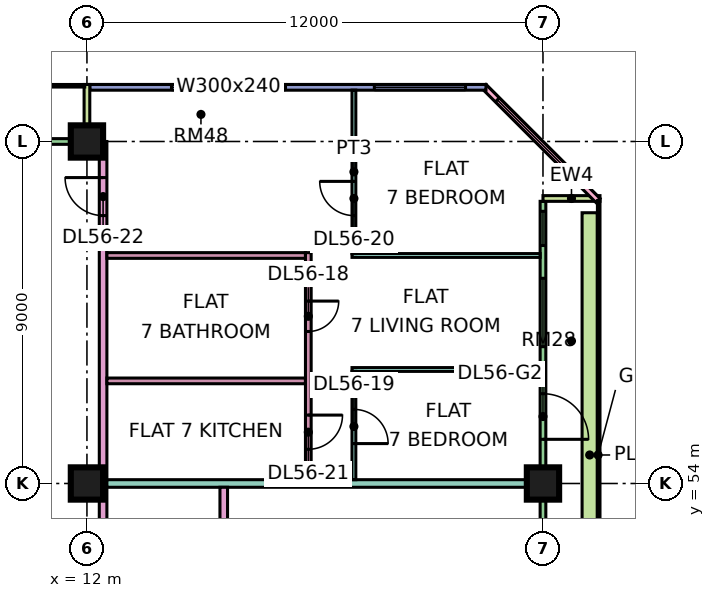
"""IFC4 building model, lengths in metres.
Left out: names, types, materials, properties, quantities, classifications, styles, units other than length and angle.
Written with IfcOpenShell. Run it as: python <this file> out.ifc"""

import sys

from ifc_helpers import new_model, si_unit, direction, frame, frame_2d, origin, origin_2d, place, context, subcontext, project, spatial, rectangle, extrude, element, fill, save


model = new_model("IFC4")
c1 = context("Model", 3, precision=1e-05, world=origin(), true_north=direction((0.0, 1.0)))
c2 = subcontext(c1, "Body", "Model", "MODEL_VIEW")
j1 = project(units=[si_unit("LENGTHUNIT", "METRE"), si_unit("PLANEANGLEUNIT", "RADIAN")], contexts=[c1])
p1 = place(None, origin())
s1 = spatial("IfcSite", under=j1, at=p1, CompositionType="ELEMENT")
p2 = place(p1, origin())
s2 = spatial("IfcBuilding", under=s1, at=p2, CompositionType="ELEMENT")
p3 = place(p2, frame((0.0, 0.0, 237.9)))
s3 = spatial("IfcBuildingStorey", under=s2, at=p3, CompositionType="ELEMENT", Elevation=237.9)
for number, where, z_axis, x_axis in (
    (1, (12.0, 54.0, 0.0), (0.0, 0.0, 1.0), (1.0, 0.0, 0.0)),
    (2, (12.0, 63.0, 0.0), (0.0, 0.0, 1.0), (1.0, 0.0, 0.0)),
    (3, (24.0, 54.0, 0.0), (0.0, 0.0, 1.0), (1.0, 0.0, 0.0)),
):
    element("IfcColumn", number, at=place(p3, frame(where, z_axis=z_axis, x_axis=x_axis)), inside=s3, PredefinedType="COLUMN", context=c2, shape_type="SweptSolid", body=[
        extrude(rectangle(XDim=0.85, YDim=0.85, at=origin_2d()), origin(), (0.0, 0.0, 1.0), 3.75),
    ])
p4 = place(p3, frame((24.0, 48.075, 0.0), z_axis=(0.0, 0.0, 1.0), x_axis=(0.0, 1.0, 0.0)))
e4 = element("IfcWall", 4, at=p4, inside=s3, PredefinedType="SOLIDWALL", context=c2, shape_type="SweptSolid", body=[
    extrude(rectangle(XDim=13.35, YDim=0.15, at=frame_2d((6.675, 0.0))), origin(), (0.0, 0.0, 1.0), 3.35),
])
p5 = place(p4, frame((0.6, 0.0, 0.45)))
e5 = element("IfcOpeningElement", 5, at=p5, cuts=e4, PredefinedType="OPENING", context=c2, shape_type="SweptSolid", body=[
    extrude(rectangle(XDim=4.2, YDim=2.4, at=frame_2d((2.1, 1.2))), frame((0.0, 0.085, 0.0), z_axis=(0.0, -1.0, 0.0), x_axis=(1.0, 0.0, 0.0)), (0.0, 0.0, 1.0), 0.17),
])
p6 = place(p4, frame((7.087, 0.0, 0.0)))
e6 = element("IfcOpeningElement", 6, at=p6, cuts=e4, PredefinedType="OPENING", context=c2, shape_type="SweptSolid", body=[
    extrude(rectangle(XDim=1.2, YDim=2.4, at=frame_2d((0.6, 1.2))), frame((0.0, 0.085, 0.0), z_axis=(0.0, -1.0, 0.0), x_axis=(1.0, 0.0, 0.0)), (0.0, 0.0, 1.0), 0.17),
])
p7 = place(p4, frame((9.525, 0.0, 0.45)))
e7 = element("IfcOpeningElement", 7, at=p7, cuts=e4, PredefinedType="OPENING", context=c2, shape_type="SweptSolid", body=[
    extrude(rectangle(XDim=1.8, YDim=2.4, at=frame_2d((0.9, 1.2))), frame((0.0, 0.085, 0.0), z_axis=(0.0, -1.0, 0.0), x_axis=(1.0, 0.0, 0.0)), (0.0, 0.0, 1.0), 0.17),
])
p8 = place(p4, frame((12.188, 0.0, 0.45)))
e8 = element("IfcOpeningElement", 8, at=p8, cuts=e4, PredefinedType="OPENING", context=c2, shape_type="SweptSolid", body=[
    extrude(rectangle(XDim=0.9, YDim=2.4, at=frame_2d((0.45, 1.2))), frame((0.0, 0.085, 0.0), z_axis=(0.0, -1.0, 0.0), x_axis=(1.0, 0.0, 0.0)), (0.0, 0.0, 1.0), 0.17),
])
p9 = place(p3, frame((25.5, 61.5, 0.0), z_axis=(0.0, 0.0, 1.0), x_axis=(-1.0, 0.0, 0.0)))
e9 = element("IfcWall", 9, at=p9, inside=s3, PredefinedType="SOLIDWALL", context=c2, shape_type="SweptSolid", body=[
    extrude(rectangle(XDim=1.5, YDim=0.15, at=frame_2d((0.75, 0.0))), origin(), (0.0, 0.0, 1.0), 3.35),
])
p10 = place(p3, frame((25.447, 61.447, 0.0), z_axis=(0.0, 0.0, 1.0), x_axis=(-0.707106781187, 0.707106781187, 0.0)))
e10 = element("IfcWall", 10, at=p10, inside=s3, PredefinedType="SOLIDWALL", context=c2, shape_type="SweptSolid", body=[
    extrude(rectangle(XDim=4.243, YDim=0.15, at=frame_2d((2.121, 0.0))), origin(), (0.0, 0.0, 1.0), 3.35),
])
p11 = place(p10, frame((0.744, 0.0, 0.45)))
e11 = element("IfcOpeningElement", 11, at=p11, cuts=e10, PredefinedType="OPENING", context=c2, shape_type="SweptSolid", body=[
    extrude(rectangle(XDim=3.0, YDim=2.4, at=frame_2d((1.5, 1.2))), frame((0.0, 0.085, 0.0), z_axis=(0.0, -1.0, 0.0), x_axis=(1.0, 0.0, 0.0)), (0.0, 0.0, 1.0), 0.17),
])
p12 = place(p3, frame((22.5, 64.425, 0.0), z_axis=(0.0, 0.0, 1.0), x_axis=(-1.0, 0.0, 0.0)))
e12 = element("IfcWall", 12, at=p12, inside=s3, PredefinedType="SOLIDWALL", context=c2, shape_type="SweptSolid", body=[
    extrude(rectangle(XDim=10.425, YDim=0.15, at=frame_2d((5.212, 0.0))), origin(), (0.0, 0.0, 1.0), 3.35),
])
p13 = place(p12, frame((0.538, 0.0, 0.45)))
e13 = element("IfcOpeningElement", 13, at=p13, cuts=e12, PredefinedType="OPENING", context=c2, shape_type="SweptSolid", body=[
    extrude(rectangle(XDim=2.4, YDim=2.4, at=frame_2d((1.2, 1.2))), frame((0.0, 0.085, 0.0), z_axis=(0.0, -1.0, 0.0), x_axis=(1.0, 0.0, 0.0)), (0.0, 0.0, 1.0), 0.17),
])
p14 = place(p12, frame((5.275, 0.0, 0.45)))
e14 = element("IfcOpeningElement", 14, at=p14, cuts=e12, PredefinedType="OPENING", context=c2, shape_type="SweptSolid", body=[
    extrude(rectangle(XDim=3.0, YDim=2.4, at=frame_2d((1.5, 1.2))), frame((0.0, 0.085, 0.0), z_axis=(0.0, -1.0, 0.0), x_axis=(1.0, 0.0, 0.0)), (0.0, 0.0, 1.0), 0.17),
])
p15 = place(p3, frame((11.925, 63.0, 0.0), z_axis=(0.0, 0.0, 1.0), x_axis=(-1.0, 0.0, 0.0)))
e15 = element("IfcWall", 15, at=p15, inside=s3, PredefinedType="SOLIDWALL", context=c2, shape_type="SweptSolid", body=[
    extrude(rectangle(XDim=10.35, YDim=0.15, at=frame_2d((5.175, 0.0))), origin(), (0.0, 0.0, 1.0), 3.35),
])
p16 = place(p15, frame((2.775, 0.0, 0.45)))
e16 = element("IfcOpeningElement", 16, at=p16, cuts=e15, PredefinedType="OPENING", context=c2, shape_type="SweptSolid", body=[
    extrude(rectangle(XDim=2.4, YDim=2.4, at=frame_2d((1.2, 1.2))), frame((0.0, 0.085, 0.0), z_axis=(0.0, -1.0, 0.0), x_axis=(1.0, 0.0, 0.0)), (0.0, 0.0, 1.0), 0.17),
])
p17 = place(p15, frame((7.087, 0.0, 0.0)))
e17 = element("IfcOpeningElement", 17, at=p17, cuts=e15, PredefinedType="OPENING", context=c2, shape_type="SweptSolid", body=[
    extrude(rectangle(XDim=1.8, YDim=2.4, at=frame_2d((0.9, 1.2))), frame((0.0, 0.085, 0.0), z_axis=(0.0, -1.0, 0.0), x_axis=(1.0, 0.0, 0.0)), (0.0, 0.0, 1.0), 0.17),
])
p18 = place(p3, frame((12.0, 64.5, 0.0), z_axis=(0.0, 0.0, 1.0), x_axis=(0.0, -1.0, 0.0)))
e18 = element("IfcWall", 18, at=p18, inside=s3, PredefinedType="SOLIDWALL", context=c2, shape_type="SweptSolid", body=[
    extrude(rectangle(XDim=1.5, YDim=0.15, at=frame_2d((0.75, 0.0))), origin(), (0.0, 0.0, 1.0), 3.35),
])
p19 = place(p3, frame((25.229, 48.375, 0.0), z_axis=(0.0, 0.0, 1.0), x_axis=(0.0, 1.0, 0.0)))
e19 = element("IfcWall", 19, at=p19, inside=s3, PredefinedType="SOLIDWALL", context=c2, shape_type="SweptSolid", body=[
    extrude(rectangle(XDim=12.75, YDim=0.4, at=frame_2d((6.375, 0.0))), origin(), (0.0, 0.0, 1.0), 0.7),
])
p20 = place(p3, frame((12.425, 20.0, 0.0), z_axis=(0.0, 0.0, 1.0), x_axis=(0.0, 1.0, 0.0)))
e20 = element("IfcWall", 20, at=p20, inside=s3, PredefinedType="PARTITIONING", context=c2, shape_type="SweptSolid", body=[
    extrude(rectangle(XDim=43.0, YDim=0.2, at=frame_2d((21.5, 0.0))), origin(), (0.0, 0.0, 1.0), 3.35),
])
p21 = place(p20, frame((5.95, 0.0, 0.0)))
e21 = element("IfcOpeningElement", 21, at=p21, cuts=e20, PredefinedType="OPENING", context=c2, shape_type="SweptSolid", body=[
    extrude(rectangle(XDim=1.0, YDim=2.1, at=frame_2d((0.5, 1.05))), frame((0.0, 0.11, 0.0), z_axis=(0.0, -1.0, 0.0), x_axis=(1.0, 0.0, 0.0)), (0.0, 0.0, 1.0), 0.22),
])
p22 = place(p20, frame((12.0, 0.0, 0.0)))
e22 = element("IfcOpeningElement", 22, at=p22, cuts=e20, PredefinedType="OPENING", context=c2, shape_type="SweptSolid", body=[
    extrude(rectangle(XDim=1.0, YDim=2.1, at=frame_2d((0.5, 1.05))), frame((0.0, 0.11, 0.0), z_axis=(0.0, -1.0, 0.0), x_axis=(1.0, 0.0, 0.0)), (0.0, 0.0, 1.0), 0.22),
])
p23 = place(p20, frame((16.9, 0.0, 0.0)))
e23 = element("IfcOpeningElement", 23, at=p23, cuts=e20, PredefinedType="OPENING", context=c2, shape_type="SweptSolid", body=[
    extrude(rectangle(XDim=1.0, YDim=2.1, at=frame_2d((0.5, 1.05))), frame((0.0, 0.11, 0.0), z_axis=(0.0, -1.0, 0.0), x_axis=(1.0, 0.0, 0.0)), (0.0, 0.0, 1.0), 0.22),
])
p24 = place(p20, frame((41.05, 0.0, 0.0)))
e24 = element("IfcOpeningElement", 24, at=p24, cuts=e20, PredefinedType="OPENING", context=c2, shape_type="SweptSolid", body=[
    extrude(rectangle(XDim=1.0, YDim=2.1, at=frame_2d((0.5, 1.05))), frame((0.0, 0.11, 0.0), z_axis=(0.0, -1.0, 0.0), x_axis=(1.0, 0.0, 0.0)), (0.0, 0.0, 1.0), 0.22),
])
p25 = place(p20, frame((1.15, 0.0, 0.0)))
e25 = element("IfcOpeningElement", 25, at=p25, cuts=e20, PredefinedType="OPENING", context=c2, shape_type="SweptSolid", body=[
    extrude(rectangle(XDim=1.8, YDim=2.1, at=frame_2d((0.9, 1.05))), frame((0.0, 0.11, 0.0), z_axis=(0.0, -1.0, 0.0), x_axis=(1.0, 0.0, 0.0)), (0.0, 0.0, 1.0), 0.22),
])
p26 = place(p20, frame((28.6, 0.0, 0.0)))
e26 = element("IfcOpeningElement", 26, at=p26, cuts=e20, PredefinedType="OPENING", context=c2, shape_type="SweptSolid", body=[
    extrude(rectangle(XDim=1.8, YDim=2.1, at=frame_2d((0.9, 1.05))), frame((0.0, 0.11, 0.0), z_axis=(0.0, -1.0, 0.0), x_axis=(1.0, 0.0, 0.0)), (0.0, 0.0, 1.0), 0.22),
])
p27 = place(p3, frame((12.525, 54.0, 0.0), z_axis=(0.0, 0.0, 1.0), x_axis=(1.0, 0.0, 0.0)))
e27 = element("IfcWall", 27, at=p27, inside=s3, PredefinedType="PARTITIONING", context=c2, shape_type="SweptSolid", body=[
    extrude(rectangle(XDim=11.401, YDim=0.2, at=frame_2d((5.701, 0.0))), origin(), (0.0, 0.0, 1.0), 3.35),
])
for number, where, z_axis, x_axis in (
    (28, (12.525, 56.7, 0.0), (0.0, 0.0, 1.0), (1.0, 0.0, 0.0)),
    (29, (12.525, 60.0, 0.0), (0.0, 0.0, 1.0), (1.0, 0.0, 0.0)),
):
    element("IfcWall", number, at=place(p3, frame(where, z_axis=z_axis, x_axis=x_axis)), inside=s3, PredefinedType="PARTITIONING", context=c2, shape_type="SweptSolid", body=[
        extrude(rectangle(XDim=5.225, YDim=0.15, at=frame_2d((2.613, 0.0))), origin(), (0.0, 0.0, 1.0), 3.35),
    ])
p28 = place(p3, frame((15.6, 51.225, 0.0), z_axis=(0.0, 0.0, 1.0), x_axis=(0.0, 1.0, 0.0)))
e30 = element("IfcWall", 30, at=p28, inside=s3, PredefinedType="PARTITIONING", context=c2, shape_type="SweptSolid", body=[
    extrude(rectangle(XDim=2.675, YDim=0.2, at=frame_2d((1.337, 0.0))), origin(), (0.0, 0.0, 1.0), 3.35),
])
p29 = place(p3, frame((17.825, 54.1, 0.0), z_axis=(0.0, 0.0, 1.0), x_axis=(0.0, 1.0, 0.0)))
e31 = element("IfcWall", 31, at=p29, inside=s3, PredefinedType="PARTITIONING", context=c2, shape_type="SweptSolid", body=[
    extrude(rectangle(XDim=5.975, YDim=0.15, at=frame_2d((2.987, 0.0))), origin(), (0.0, 0.0, 1.0), 3.35),
])
p30 = place(p29, frame((3.9, 0.0, 0.0)))
e32 = element("IfcOpeningElement", 32, at=p30, cuts=e31, PredefinedType="OPENING", context=c2, shape_type="SweptSolid", body=[
    extrude(rectangle(XDim=0.8, YDim=2.1, at=frame_2d((0.4, 1.05))), frame((0.0, 0.085, 0.0), z_axis=(0.0, -1.0, 0.0), x_axis=(1.0, 0.0, 0.0)), (0.0, 0.0, 1.0), 0.17),
])
p31 = place(p29, frame((0.8, 0.0, 0.0)))
e33 = element("IfcOpeningElement", 33, at=p31, cuts=e31, PredefinedType="OPENING", context=c2, shape_type="SweptSolid", body=[
    extrude(rectangle(XDim=0.9, YDim=2.1, at=frame_2d((0.45, 1.05))), frame((0.0, 0.085, 0.0), z_axis=(0.0, -1.0, 0.0), x_axis=(1.0, 0.0, 0.0)), (0.0, 0.0, 1.0), 0.17),
])
for number, where, z_axis, x_axis in (
    (34, (18.975, 57.0, 0.0), (0.0, 0.0, 1.0), (1.0, 0.0, 0.0)),
    (35, (18.975, 60.0, 0.0), (0.0, 0.0, 1.0), (1.0, 0.0, 0.0)),
):
    element("IfcWall", number, at=place(p3, frame(where, z_axis=z_axis, x_axis=x_axis)), inside=s3, PredefinedType="PARTITIONING", context=c2, shape_type="SweptSolid", body=[
        extrude(rectangle(XDim=4.951, YDim=0.1, at=frame_2d((2.476, 0.0))), origin(), (0.0, 0.0, 1.0), 3.35),
    ])
p32 = place(p3, frame((19.025, 54.1, 0.0), z_axis=(0.0, 0.0, 1.0), x_axis=(0.0, 1.0, 0.0)))
e36 = element("IfcWall", 36, at=p32, inside=s3, PredefinedType="PARTITIONING", context=c2, shape_type="SweptSolid", body=[
    extrude(rectangle(XDim=2.85, YDim=0.1, at=frame_2d((1.425, 0.0))), origin(), (0.0, 0.0, 1.0), 3.35),
])
p33 = place(p32, frame((0.95, 0.0, 0.0)))
e37 = element("IfcOpeningElement", 37, at=p33, cuts=e36, PredefinedType="OPENING", context=c2, shape_type="SweptSolid", body=[
    extrude(rectangle(XDim=0.9, YDim=2.1, at=frame_2d((0.45, 1.05))), frame((0.0, 0.06, 0.0), z_axis=(0.0, -1.0, 0.0), x_axis=(1.0, 0.0, 0.0)), (0.0, 0.0, 1.0), 0.12),
])
p34 = place(p3, frame((19.025, 60.05, 0.0), z_axis=(0.0, 0.0, 1.0), x_axis=(0.0, 1.0, 0.0)))
e38 = element("IfcWall", 38, at=p34, inside=s3, PredefinedType="PARTITIONING", context=c2, shape_type="SweptSolid", body=[
    extrude(rectangle(XDim=4.301, YDim=0.1, at=frame_2d((2.15, 0.0))), origin(), (0.0, 0.0, 1.0), 3.35),
])
p35 = place(p34, frame((1.0, 0.0, 0.0)))
e39 = element("IfcOpeningElement", 39, at=p35, cuts=e38, PredefinedType="OPENING", context=c2, shape_type="SweptSolid", body=[
    extrude(rectangle(XDim=0.9, YDim=2.1, at=frame_2d((0.45, 1.05))), frame((0.0, 0.06, 0.0), z_axis=(0.0, -1.0, 0.0), x_axis=(1.0, 0.0, 0.0)), (0.0, 0.0, 1.0), 0.12),
])
p36 = place(p6, frame((1.2, 0.0, 0.0), z_axis=(0.0, 0.0, 1.0), x_axis=(-1.0, 0.0, 0.0)))
e40 = element("IfcDoor", 40, at=p36, inside=s3, OperationType="DOUBLE_DOOR_SINGLE_SWING", PredefinedType="DOOR", context=c2, shape_type="SweptSolid", body=[
    extrude(rectangle(XDim=1.2, YDim=2.4, at=frame_2d((0.6, 1.2))), frame((0.0, 0.025, 0.0), z_axis=(0.0, -1.0, 0.0), x_axis=(1.0, 0.0, 0.0)), (0.0, 0.0, 1.0), 0.05),
])
fill(e6, e40)
p37 = place(p7, origin())
e41 = element("IfcWindow", 41, at=p37, inside=s3, PartitioningType="SINGLE_PANEL", PredefinedType="WINDOW", context=c2, shape_type="SweptSolid", body=[
    extrude(rectangle(XDim=1.8, YDim=2.4, at=frame_2d((0.9, 1.2))), frame((0.0, 0.03, 0.0), z_axis=(0.0, -1.0, 0.0), x_axis=(1.0, 0.0, 0.0)), (0.0, 0.0, 1.0), 0.06),
])
fill(e7, e41)
p38 = place(p8, origin())
e42 = element("IfcWindow", 42, at=p38, inside=s3, PartitioningType="SINGLE_PANEL", PredefinedType="WINDOW", context=c2, shape_type="SweptSolid", body=[
    extrude(rectangle(XDim=0.9, YDim=2.4, at=frame_2d((0.45, 1.2))), frame((0.0, 0.03, 0.0), z_axis=(0.0, -1.0, 0.0), x_axis=(1.0, 0.0, 0.0)), (0.0, 0.0, 1.0), 0.06),
])
fill(e8, e42)
p39 = place(p11, origin())
e43 = element("IfcWindow", 43, at=p39, inside=s3, PartitioningType="SINGLE_PANEL", PredefinedType="WINDOW", context=c2, shape_type="SweptSolid", body=[
    extrude(rectangle(XDim=3.0, YDim=2.4, at=frame_2d((1.5, 1.2))), frame((0.0, 0.03, 0.0), z_axis=(0.0, -1.0, 0.0), x_axis=(1.0, 0.0, 0.0)), (0.0, 0.0, 1.0), 0.06),
])
fill(e11, e43)
p40 = place(p13, origin())
e44 = element("IfcWindow", 44, at=p40, inside=s3, PartitioningType="SINGLE_PANEL", PredefinedType="WINDOW", context=c2, shape_type="SweptSolid", body=[
    extrude(rectangle(XDim=2.4, YDim=2.4, at=frame_2d((1.2, 1.2))), frame((0.0, 0.03, 0.0), z_axis=(0.0, -1.0, 0.0), x_axis=(1.0, 0.0, 0.0)), (0.0, 0.0, 1.0), 0.06),
])
fill(e13, e44)
p41 = place(p14, origin())
e45 = element("IfcWindow", 45, at=p41, inside=s3, PartitioningType="SINGLE_PANEL", PredefinedType="WINDOW", context=c2, shape_type="SweptSolid", body=[
    extrude(rectangle(XDim=3.0, YDim=2.4, at=frame_2d((1.5, 1.2))), frame((0.0, 0.03, 0.0), z_axis=(0.0, -1.0, 0.0), x_axis=(1.0, 0.0, 0.0)), (0.0, 0.0, 1.0), 0.06),
])
fill(e14, e45)
p42 = place(p30, origin())
e46 = element("IfcDoor", 46, at=p42, inside=s3, OperationType="SINGLE_SWING_RIGHT", PredefinedType="DOOR", context=c2, shape_type="SweptSolid", body=[
    extrude(rectangle(XDim=0.8, YDim=2.1, at=frame_2d((0.4, 1.05))), frame((0.0, 0.025, 0.0), z_axis=(0.0, -1.0, 0.0), x_axis=(1.0, 0.0, 0.0)), (0.0, 0.0, 1.0), 0.05),
])
fill(e32, e46)
p43 = place(p33, frame((0.9, 0.0, 0.0), z_axis=(0.0, 0.0, 1.0), x_axis=(-1.0, 0.0, 0.0)))
e47 = element("IfcDoor", 47, at=p43, inside=s3, OperationType="SINGLE_SWING_LEFT", PredefinedType="DOOR", context=c2, shape_type="SweptSolid", body=[
    extrude(rectangle(XDim=0.9, YDim=2.1, at=frame_2d((0.45, 1.05))), frame((0.0, 0.025, 0.0), z_axis=(0.0, -1.0, 0.0), x_axis=(1.0, 0.0, 0.0)), (0.0, 0.0, 1.0), 0.05),
])
fill(e37, e47)
p44 = place(p35, frame((0.9, 0.0, 0.0), z_axis=(0.0, 0.0, 1.0), x_axis=(-1.0, 0.0, 0.0)))
e48 = element("IfcDoor", 48, at=p44, inside=s3, OperationType="SINGLE_SWING_RIGHT", PredefinedType="DOOR", context=c2, shape_type="SweptSolid", body=[
    extrude(rectangle(XDim=0.9, YDim=2.1, at=frame_2d((0.45, 1.05))), frame((0.0, 0.025, 0.0), z_axis=(0.0, -1.0, 0.0), x_axis=(1.0, 0.0, 0.0)), (0.0, 0.0, 1.0), 0.05),
])
fill(e39, e48)
p45 = place(p31, origin())
e49 = element("IfcDoor", 49, at=p45, inside=s3, OperationType="SINGLE_SWING_RIGHT", PredefinedType="DOOR", context=c2, shape_type="SweptSolid", body=[
    extrude(rectangle(XDim=0.9, YDim=2.1, at=frame_2d((0.45, 1.05))), frame((0.0, 0.025, 0.0), z_axis=(0.0, -1.0, 0.0), x_axis=(1.0, 0.0, 0.0)), (0.0, 0.0, 1.0), 0.05),
])
fill(e33, e49)
p46 = place(p24, frame((1.0, 0.0, 0.0), z_axis=(0.0, 0.0, 1.0), x_axis=(-1.0, 0.0, 0.0)))
e50 = element("IfcDoor", 50, at=p46, inside=s3, OperationType="SINGLE_SWING_RIGHT", PredefinedType="DOOR", context=c2, shape_type="SweptSolid", body=[
    extrude(rectangle(XDim=1.0, YDim=2.1, at=frame_2d((0.5, 1.05))), frame((0.0, 0.025, 0.0), z_axis=(0.0, -1.0, 0.0), x_axis=(1.0, 0.0, 0.0)), (0.0, 0.0, 1.0), 0.05),
])
fill(e24, e50)
save(model, sys.argv[1])
